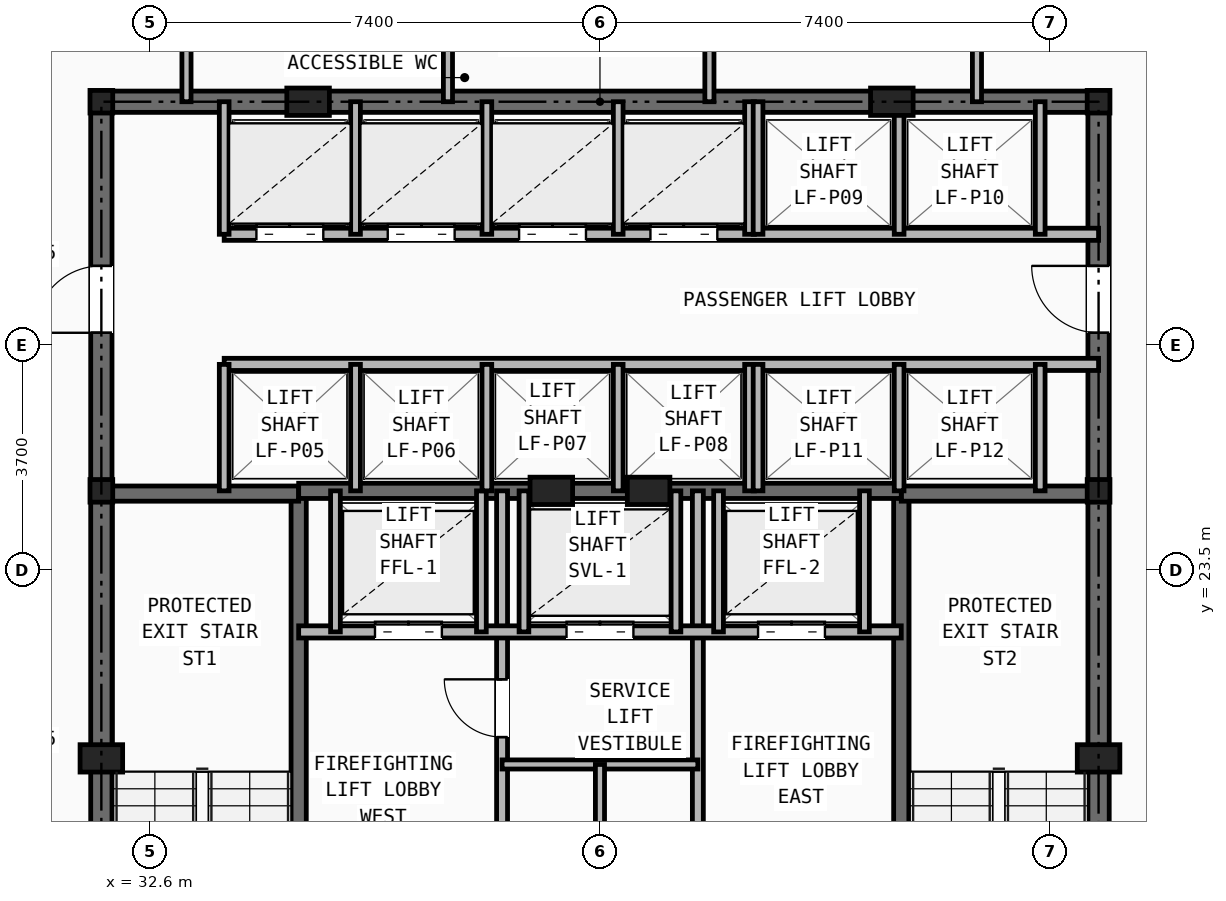
"""IFC4 building model, lengths in metres.
Left out: names, types, materials, properties, quantities, classifications, styles, units other than length and angle.
Written with IfcOpenShell. Run it as: python <this file> out.ifc"""

import sys

from ifc_helpers import new_model, si_unit, direction, frame, frame_2d, origin, origin_2d, place, context, subcontext, project, spatial, rectangle, i_section, extrude, element, fill, save


model = new_model("IFC4")
c1 = context("Model", 3, precision=1e-05, world=origin(), true_north=direction((0.0, 1.0)))
c2 = subcontext(c1, "Body", "Model", "MODEL_VIEW")
j1 = project(units=[si_unit("LENGTHUNIT", "METRE"), si_unit("PLANEANGLEUNIT", "RADIAN")], contexts=[c1])
p1 = place(None, origin())
s1 = spatial("IfcSite", under=j1, at=p1, CompositionType="ELEMENT")
p2 = place(p1, origin())
s2 = spatial("IfcBuilding", under=s1, at=p2, CompositionType="ELEMENT")
p3 = place(p2, frame((0.0, 0.0, 99.0)))
s3 = spatial("IfcBuildingStorey", under=s2, at=p3, CompositionType="ELEMENT", Elevation=99.0)
for number, where, z_axis, x_axis in (
    (1, (31.8, 24.8, 0.0), (0.0, 0.0, 1.0), (1.0, 0.0, 0.0)),
    (2, (48.2, 24.8, 0.0), (0.0, 0.0, 1.0), (1.0, 0.0, 0.0)),
    (3, (31.8, 31.2, 0.0), (0.0, 0.0, 1.0), (1.0, 0.0, 0.0)),
    (4, (48.2, 31.2, 0.0), (0.0, 0.0, 1.0), (1.0, 0.0, 0.0)),
):
    element("IfcColumn", number, at=place(p3, frame(where, z_axis=z_axis, x_axis=x_axis)), inside=s3, PredefinedType="COLUMN", context=c2, shape_type="SweptSolid", body=[
        extrude(i_section(OverallWidth=0.374, OverallDepth=0.372, WebThickness=0.016, FlangeThickness=0.026, at=origin_2d()), origin(), (0.0, 0.0, 1.0), 3.2),
    ])
for number, where, z_axis, x_axis in (
    (5, (31.8, 20.4, 0.0), (0.0, 0.0, 1.0), (1.0, 0.0, 0.0)),
    (6, (48.2, 20.4, 0.0), (0.0, 0.0, 1.0), (1.0, 0.0, 0.0)),
    (7, (35.2, 31.2, 0.0), (0.0, 0.0, 1.0), (1.0, 0.0, 0.0)),
    (8, (44.8, 31.2, 0.0), (0.0, 0.0, 1.0), (1.0, 0.0, 0.0)),
    (9, (39.2, 24.8, 0.0), (0.0, 0.0, 1.0), (1.0, 0.0, 0.0)),
    (10, (40.8, 24.8, 0.0), (0.0, 0.0, 1.0), (1.0, 0.0, 0.0)),
):
    element("IfcColumn", number, at=place(p3, frame(where, z_axis=z_axis, x_axis=x_axis)), inside=s3, PredefinedType="PILASTER", context=c2, shape_type="SweptSolid", body=[
        extrude(rectangle(XDim=0.7, YDim=0.45, at=origin_2d()), origin(), (0.0, 0.0, 1.0), 3.2),
    ])
p4 = place(p3, frame((31.8, 31.2, 0.0), z_axis=(0.0, 0.0, 1.0), x_axis=(1.0, 0.0, 0.0)))
e11 = element("IfcWall", 11, at=p4, inside=s3, PredefinedType="SHEAR", context=c2, shape_type="SweptSolid", body=[
    extrude(rectangle(XDim=16.4, YDim=0.35, at=frame_2d((8.2, 0.0))), origin(), (0.0, 0.0, 1.0), 2.97),
])
p5 = place(p3, frame((31.8, 16.4, 0.0), z_axis=(0.0, 0.0, 1.0), x_axis=(0.0, 1.0, 0.0)))
e12 = element("IfcWall", 12, at=p5, inside=s3, PredefinedType="SHEAR", context=c2, shape_type="SweptSolid", body=[
    extrude(rectangle(XDim=14.8, YDim=0.35, at=frame_2d((7.4, 0.0))), origin(), (0.0, 0.0, 1.0), 2.97),
])
p6 = place(p5, frame((11.0, 0.0, 0.0)))
e13 = element("IfcOpeningElement", 13, at=p6, cuts=e12, PredefinedType="OPENING", context=c2, shape_type="SweptSolid", body=[
    extrude(rectangle(XDim=1.1, YDim=2.15, at=frame_2d((0.55, 1.075))), frame((0.0, 0.185, 0.0), z_axis=(0.0, -1.0, 0.0), x_axis=(1.0, 0.0, 0.0)), (0.0, 0.0, 1.0), 0.37),
])
p7 = place(p3, frame((48.2, 16.4, 0.0), z_axis=(0.0, 0.0, 1.0), x_axis=(0.0, 1.0, 0.0)))
e14 = element("IfcWall", 14, at=p7, inside=s3, PredefinedType="SHEAR", context=c2, shape_type="SweptSolid", body=[
    extrude(rectangle(XDim=14.8, YDim=0.35, at=frame_2d((7.4, 0.0))), origin(), (0.0, 0.0, 1.0), 2.97),
])
p8 = place(p7, frame((11.0, 0.0, 0.0)))
e15 = element("IfcOpeningElement", 15, at=p8, cuts=e14, PredefinedType="OPENING", context=c2, shape_type="SweptSolid", body=[
    extrude(rectangle(XDim=1.1, YDim=2.15, at=frame_2d((0.55, 1.075))), frame((0.0, 0.185, 0.0), z_axis=(0.0, -1.0, 0.0), x_axis=(1.0, 0.0, 0.0)), (0.0, 0.0, 1.0), 0.37),
])
p9 = place(p3, frame((35.045, 16.4, 0.0), z_axis=(0.0, 0.0, 1.0), x_axis=(0.0, 1.0, 0.0)))
e16 = element("IfcWall", 16, at=p9, inside=s3, PredefinedType="SHEAR", context=c2, shape_type="SweptSolid", body=[
    extrude(rectangle(XDim=8.4, YDim=0.25, at=frame_2d((4.2, 0.0))), origin(), (0.0, 0.0, 1.0), 2.97),
])
p10 = place(p9, frame((0.45, 0.0, 0.0)))
e17 = element("IfcOpeningElement", 17, at=p10, cuts=e16, PredefinedType="OPENING", context=c2, shape_type="SweptSolid", body=[
    extrude(rectangle(XDim=0.95, YDim=2.1, at=frame_2d((0.475, 1.05))), frame((0.0, 0.135, 0.0), z_axis=(0.0, -1.0, 0.0), x_axis=(1.0, 0.0, 0.0)), (0.0, 0.0, 1.0), 0.27),
])
p11 = place(p3, frame((31.8, 24.755, 0.0), z_axis=(0.0, 0.0, 1.0), x_axis=(1.0, 0.0, 0.0)))
e18 = element("IfcWall", 18, at=p11, inside=s3, PredefinedType="SHEAR", context=c2, shape_type="SweptSolid", body=[
    extrude(rectangle(XDim=3.245, YDim=0.25, at=frame_2d((1.623, 0.0))), origin(), (0.0, 0.0, 1.0), 2.97),
])
p12 = place(p3, frame((44.955, 16.4, 0.0), z_axis=(0.0, 0.0, 1.0), x_axis=(0.0, 1.0, 0.0)))
e19 = element("IfcWall", 19, at=p12, inside=s3, PredefinedType="SHEAR", context=c2, shape_type="SweptSolid", body=[
    extrude(rectangle(XDim=8.4, YDim=0.25, at=frame_2d((4.2, 0.0))), origin(), (0.0, 0.0, 1.0), 2.97),
])
p13 = place(p12, frame((0.45, 0.0, 0.0)))
e20 = element("IfcOpeningElement", 20, at=p13, cuts=e19, PredefinedType="OPENING", context=c2, shape_type="SweptSolid", body=[
    extrude(rectangle(XDim=0.95, YDim=2.1, at=frame_2d((0.475, 1.05))), frame((0.0, 0.135, 0.0), z_axis=(0.0, -1.0, 0.0), x_axis=(1.0, 0.0, 0.0)), (0.0, 0.0, 1.0), 0.27),
])
p14 = place(p3, frame((44.955, 24.755, 0.0), z_axis=(0.0, 0.0, 1.0), x_axis=(1.0, 0.0, 0.0)))
e21 = element("IfcWall", 21, at=p14, inside=s3, PredefinedType="SHEAR", context=c2, shape_type="SweptSolid", body=[
    extrude(rectangle(XDim=3.245, YDim=0.25, at=frame_2d((1.623, 0.0))), origin(), (0.0, 0.0, 1.0), 2.97),
])
p15 = place(p3, frame((35.045, 24.8, 0.0), z_axis=(0.0, 0.0, 1.0), x_axis=(1.0, 0.0, 0.0)))
e22 = element("IfcWall", 22, at=p15, inside=s3, PredefinedType="SHEAR", context=c2, shape_type="SweptSolid", body=[
    extrude(rectangle(XDim=9.91, YDim=0.25, at=frame_2d((4.955, 0.0))), origin(), (0.0, 0.0, 1.0), 2.97),
])
p16 = place(p3, frame((38.39, 16.4, 0.0), z_axis=(0.0, 0.0, 1.0), x_axis=(0.0, 1.0, 0.0)))
e23 = element("IfcWall", 23, at=p16, inside=s3, PredefinedType="PARTITIONING", context=c2, shape_type="SweptSolid", body=[
    extrude(rectangle(XDim=8.4, YDim=0.18, at=frame_2d((4.2, 0.0))), origin(), (0.0, 0.0, 1.0), 2.421),
])
p17 = place(p16, frame((1.8, 0.0, 0.0)))
e24 = element("IfcOpeningElement", 24, at=p17, cuts=e23, PredefinedType="OPENING", context=c2, shape_type="SweptSolid", body=[
    extrude(rectangle(XDim=0.85, YDim=2.05, at=frame_2d((0.425, 1.025))), frame((0.0, 0.1, 0.0), z_axis=(0.0, -1.0, 0.0), x_axis=(1.0, 0.0, 0.0)), (0.0, 0.0, 1.0), 0.2),
])
p18 = place(p16, frame((4.35, 0.0, 0.0)))
e25 = element("IfcOpeningElement", 25, at=p18, cuts=e23, PredefinedType="OPENING", context=c2, shape_type="SweptSolid", body=[
    extrude(rectangle(XDim=0.95, YDim=2.1, at=frame_2d((0.475, 1.05))), frame((0.0, 0.1, 0.0), z_axis=(0.0, -1.0, 0.0), x_axis=(1.0, 0.0, 0.0)), (0.0, 0.0, 1.0), 0.2),
])
p19 = place(p3, frame((41.61, 16.4, 0.0), z_axis=(0.0, 0.0, 1.0), x_axis=(0.0, 1.0, 0.0)))
e26 = element("IfcWall", 26, at=p19, inside=s3, PredefinedType="PARTITIONING", context=c2, shape_type="SweptSolid", body=[
    extrude(rectangle(XDim=8.4, YDim=0.18, at=frame_2d((4.2, 0.0))), origin(), (0.0, 0.0, 1.0), 2.421),
])
p20 = place(p19, frame((1.8, 0.0, 0.0)))
e27 = element("IfcOpeningElement", 27, at=p20, cuts=e26, PredefinedType="OPENING", context=c2, shape_type="SweptSolid", body=[
    extrude(rectangle(XDim=0.85, YDim=2.05, at=frame_2d((0.425, 1.025))), frame((0.0, 0.1, 0.0), z_axis=(0.0, -1.0, 0.0), x_axis=(1.0, 0.0, 0.0)), (0.0, 0.0, 1.0), 0.2),
])
p21 = place(p3, frame((35.045, 22.48, 0.0), z_axis=(0.0, 0.0, 1.0), x_axis=(1.0, 0.0, 0.0)))
e28 = element("IfcWall", 28, at=p21, inside=s3, PredefinedType="SOLIDWALL", context=c2, shape_type="SweptSolid", body=[
    extrude(rectangle(XDim=9.91, YDim=0.2, at=frame_2d((4.955, 0.0))), origin(), (0.0, 0.0, 1.0), 2.97),
])
p22 = place(p21, frame((1.255, 0.0, 0.0)))
e29 = element("IfcOpeningElement", 29, at=p22, cuts=e28, PredefinedType="OPENING", context=c2, shape_type="SweptSolid", body=[
    extrude(rectangle(XDim=1.1, YDim=2.15, at=frame_2d((0.55, 1.075))), frame((0.0, 0.11, 0.0), z_axis=(0.0, -1.0, 0.0), x_axis=(1.0, 0.0, 0.0)), (0.0, 0.0, 1.0), 0.22),
])
p23 = place(p21, frame((7.555, 0.0, 0.0)))
e30 = element("IfcOpeningElement", 30, at=p23, cuts=e28, PredefinedType="OPENING", context=c2, shape_type="SweptSolid", body=[
    extrude(rectangle(XDim=1.1, YDim=2.15, at=frame_2d((0.55, 1.075))), frame((0.0, 0.11, 0.0), z_axis=(0.0, -1.0, 0.0), x_axis=(1.0, 0.0, 0.0)), (0.0, 0.0, 1.0), 0.22),
])
p24 = place(p21, frame((4.405, 0.0, 0.0)))
e31 = element("IfcOpeningElement", 31, at=p24, cuts=e28, PredefinedType="OPENING", context=c2, shape_type="SweptSolid", body=[
    extrude(rectangle(XDim=1.1, YDim=2.15, at=frame_2d((0.55, 1.075))), frame((0.0, 0.11, 0.0), z_axis=(0.0, -1.0, 0.0), x_axis=(1.0, 0.0, 0.0)), (0.0, 0.0, 1.0), 0.22),
])
p25 = place(p3, frame((38.39, 20.3, 0.0), z_axis=(0.0, 0.0, 1.0), x_axis=(1.0, 0.0, 0.0)))
e32 = element("IfcWall", 32, at=p25, inside=s3, PredefinedType="PARTITIONING", context=c2, shape_type="SweptSolid", body=[
    extrude(rectangle(XDim=3.22, YDim=0.15, at=frame_2d((1.61, 0.0))), origin(), (0.0, 0.0, 1.0), 2.97),
])
p26 = place(p3, frame((40.0, 16.4, 0.0), z_axis=(0.0, 0.0, 1.0), x_axis=(0.0, 1.0, 0.0)))
e33 = element("IfcWall", 33, at=p26, inside=s3, PredefinedType="PARTITIONING", context=c2, shape_type="SweptSolid", body=[
    extrude(rectangle(XDim=3.9, YDim=0.15, at=frame_2d((1.95, 0.0))), origin(), (0.0, 0.0, 1.0), 2.421),
])
for number, where, z_axis, x_axis in (
    (34, (35.65, 22.48, 0.0), (0.0, 0.0, 1.0), (0.0, 1.0, 0.0)),
    (35, (38.05, 22.48, 0.0), (0.0, 0.0, 1.0), (0.0, 1.0, 0.0)),
    (36, (41.95, 22.48, 0.0), (0.0, 0.0, 1.0), (0.0, 1.0, 0.0)),
    (37, (44.35, 22.48, 0.0), (0.0, 0.0, 1.0), (0.0, 1.0, 0.0)),
    (38, (38.75, 22.48, 0.0), (0.0, 0.0, 1.0), (0.0, 1.0, 0.0)),
    (39, (41.25, 22.48, 0.0), (0.0, 0.0, 1.0), (0.0, 1.0, 0.0)),
):
    element("IfcWall", number, at=place(p3, frame(where, z_axis=z_axis, x_axis=x_axis)), inside=s3, PredefinedType="SOLIDWALL", context=c2, shape_type="SweptSolid", body=[
        extrude(rectangle(XDim=2.32, YDim=0.16, at=frame_2d((1.16, 0.0))), origin(), (0.0, 0.0, 1.0), 2.97),
    ])
p27 = place(p3, frame((33.82, 29.02, 0.0), z_axis=(0.0, 0.0, 1.0), x_axis=(1.0, 0.0, 0.0)))
e40 = element("IfcWall", 40, at=p27, inside=s3, PredefinedType="SOLIDWALL", context=c2, shape_type="SweptSolid", body=[
    extrude(rectangle(XDim=14.38, YDim=0.2, at=frame_2d((7.19, 0.0))), origin(), (0.0, 0.0, 1.0), 2.421),
])
p28 = place(p27, frame((0.53, 0.0, 0.0)))
e41 = element("IfcOpeningElement", 41, at=p28, cuts=e40, PredefinedType="OPENING", context=c2, shape_type="SweptSolid", body=[
    extrude(rectangle(XDim=1.1, YDim=2.15, at=frame_2d((0.55, 1.075))), frame((0.0, 0.11, 0.0), z_axis=(0.0, -1.0, 0.0), x_axis=(1.0, 0.0, 0.0)), (0.0, 0.0, 1.0), 0.22),
])
p29 = place(p27, frame((2.69, 0.0, 0.0)))
e42 = element("IfcOpeningElement", 42, at=p29, cuts=e40, PredefinedType="OPENING", context=c2, shape_type="SweptSolid", body=[
    extrude(rectangle(XDim=1.1, YDim=2.15, at=frame_2d((0.55, 1.075))), frame((0.0, 0.11, 0.0), z_axis=(0.0, -1.0, 0.0), x_axis=(1.0, 0.0, 0.0)), (0.0, 0.0, 1.0), 0.22),
])
p30 = place(p27, frame((4.85, 0.0, 0.0)))
e43 = element("IfcOpeningElement", 43, at=p30, cuts=e40, PredefinedType="OPENING", context=c2, shape_type="SweptSolid", body=[
    extrude(rectangle(XDim=1.1, YDim=2.15, at=frame_2d((0.55, 1.075))), frame((0.0, 0.11, 0.0), z_axis=(0.0, -1.0, 0.0), x_axis=(1.0, 0.0, 0.0)), (0.0, 0.0, 1.0), 0.22),
])
p31 = place(p27, frame((7.01, 0.0, 0.0)))
e44 = element("IfcOpeningElement", 44, at=p31, cuts=e40, PredefinedType="OPENING", context=c2, shape_type="SweptSolid", body=[
    extrude(rectangle(XDim=1.1, YDim=2.15, at=frame_2d((0.55, 1.075))), frame((0.0, 0.11, 0.0), z_axis=(0.0, -1.0, 0.0), x_axis=(1.0, 0.0, 0.0)), (0.0, 0.0, 1.0), 0.22),
])
p32 = place(p3, frame((33.82, 26.88, 0.0), z_axis=(0.0, 0.0, 1.0), x_axis=(1.0, 0.0, 0.0)))
e45 = element("IfcWall", 45, at=p32, inside=s3, PredefinedType="SOLIDWALL", context=c2, shape_type="SweptSolid", body=[
    extrude(rectangle(XDim=14.38, YDim=0.2, at=frame_2d((7.19, 0.0))), origin(), (0.0, 0.0, 1.0), 2.421),
])
p33 = place(p3, frame((33.82, 29.02, 0.0), z_axis=(0.0, 0.0, 1.0), x_axis=(0.0, 1.0, 0.0)))
e46 = element("IfcWall", 46, at=p33, inside=s3, PredefinedType="SOLIDWALL", context=c2, shape_type="SweptSolid", body=[
    extrude(rectangle(XDim=2.18, YDim=0.16, at=frame_2d((1.09, 0.0))), origin(), (0.0, 0.0, 1.0), 2.421),
])
p34 = place(p3, frame((33.82, 24.8, 0.0), z_axis=(0.0, 0.0, 1.0), x_axis=(0.0, 1.0, 0.0)))
e47 = element("IfcWall", 47, at=p34, inside=s3, PredefinedType="SOLIDWALL", context=c2, shape_type="SweptSolid", body=[
    extrude(rectangle(XDim=2.08, YDim=0.16, at=frame_2d((1.04, 0.0))), origin(), (0.0, 0.0, 1.0), 2.97),
])
for number, where, z_axis, x_axis in (
    (48, (35.98, 29.02, 0.0), (0.0, 0.0, 1.0), (0.0, 1.0, 0.0)),
    (49, (38.14, 29.02, 0.0), (0.0, 0.0, 1.0), (0.0, 1.0, 0.0)),
    (50, (40.3, 29.02, 0.0), (0.0, 0.0, 1.0), (0.0, 1.0, 0.0)),
    (51, (42.46, 29.02, 0.0), (0.0, 0.0, 1.0), (0.0, 1.0, 0.0)),
):
    element("IfcWall", number, at=place(p3, frame(where, z_axis=z_axis, x_axis=x_axis)), inside=s3, PredefinedType="SOLIDWALL", context=c2, shape_type="SweptSolid", body=[
        extrude(rectangle(XDim=2.18, YDim=0.16, at=frame_2d((1.09, 0.0))), origin(), (0.0, 0.0, 1.0), 2.421),
    ])
for number, where, z_axis, x_axis in (
    (52, (35.98, 24.8, 0.0), (0.0, 0.0, 1.0), (0.0, 1.0, 0.0)),
    (53, (38.14, 24.8, 0.0), (0.0, 0.0, 1.0), (0.0, 1.0, 0.0)),
    (54, (40.3, 24.8, 0.0), (0.0, 0.0, 1.0), (0.0, 1.0, 0.0)),
    (55, (42.46, 24.8, 0.0), (0.0, 0.0, 1.0), (0.0, 1.0, 0.0)),
):
    element("IfcWall", number, at=place(p3, frame(where, z_axis=z_axis, x_axis=x_axis)), inside=s3, PredefinedType="SOLIDWALL", context=c2, shape_type="SweptSolid", body=[
        extrude(rectangle(XDim=2.08, YDim=0.16, at=frame_2d((1.04, 0.0))), origin(), (0.0, 0.0, 1.0), 2.97),
    ])
for number, where, z_axis, x_axis in (
    (56, (42.6, 29.02, 0.0), (0.0, 0.0, 1.0), (0.0, 1.0, 0.0)),
    (57, (44.92, 29.02, 0.0), (0.0, 0.0, 1.0), (0.0, 1.0, 0.0)),
    (58, (47.24, 29.02, 0.0), (0.0, 0.0, 1.0), (0.0, 1.0, 0.0)),
):
    element("IfcWall", number, at=place(p3, frame(where, z_axis=z_axis, x_axis=x_axis)), inside=s3, PredefinedType="SOLIDWALL", context=c2, shape_type="SweptSolid", body=[
        extrude(rectangle(XDim=2.18, YDim=0.16, at=frame_2d((1.09, 0.0))), origin(), (0.0, 0.0, 1.0), 2.421),
    ])
for number, where, z_axis, x_axis in (
    (59, (42.6, 24.8, 0.0), (0.0, 0.0, 1.0), (0.0, 1.0, 0.0)),
    (60, (44.92, 24.8, 0.0), (0.0, 0.0, 1.0), (0.0, 1.0, 0.0)),
    (61, (47.24, 24.8, 0.0), (0.0, 0.0, 1.0), (0.0, 1.0, 0.0)),
):
    element("IfcWall", number, at=place(p3, frame(where, z_axis=z_axis, x_axis=x_axis)), inside=s3, PredefinedType="SOLIDWALL", context=c2, shape_type="SweptSolid", body=[
        extrude(rectangle(XDim=2.08, YDim=0.16, at=frame_2d((1.04, 0.0))), origin(), (0.0, 0.0, 1.0), 2.97),
    ])
for number, where, z_axis, x_axis in (
    (62, (33.2, 31.2, 0.0), (0.0, 0.0, 1.0), (0.0, 1.0, 0.0)),
    (63, (46.2, 31.2, 0.0), (0.0, 0.0, 1.0), (0.0, 1.0, 0.0)),
    (64, (37.5, 31.2, 0.0), (0.0, 0.0, 1.0), (0.0, 1.0, 0.0)),
    (65, (41.8, 31.2, 0.0), (0.0, 0.0, 1.0), (0.0, 1.0, 0.0)),
):
    element("IfcWall", number, at=place(p3, frame(where, z_axis=z_axis, x_axis=x_axis)), inside=s3, PredefinedType="PARTITIONING", context=c2, shape_type="SweptSolid", body=[
        extrude(rectangle(XDim=2.6, YDim=0.15, at=frame_2d((1.3, 0.0))), origin(), (0.0, 0.0, 1.0), 2.421),
    ])
p35 = place(p18, origin())
e66 = element("IfcDoor", 66, at=p35, inside=s3, OperationType="SINGLE_SWING_RIGHT", PredefinedType="DOOR", context=c2, shape_type="SweptSolid", body=[
    extrude(rectangle(XDim=0.95, YDim=2.1, at=frame_2d((0.475, 1.05))), frame((0.0, 0.025, 0.0), z_axis=(0.0, -1.0, 0.0), x_axis=(1.0, 0.0, 0.0)), (0.0, 0.0, 1.0), 0.05),
])
fill(e25, e66)
p36 = place(p22, origin())
e67 = element("IfcDoor", 67, at=p36, inside=s3, OperationType="DOUBLE_DOOR_SLIDING", PredefinedType="DOOR", context=c2, shape_type="SweptSolid", body=[
    extrude(rectangle(XDim=1.1, YDim=2.15, at=frame_2d((0.55, 1.075))), frame((0.0, 0.025, 0.0), z_axis=(0.0, -1.0, 0.0), x_axis=(1.0, 0.0, 0.0)), (0.0, 0.0, 1.0), 0.05),
])
fill(e29, e67)
p37 = place(p23, origin())
e68 = element("IfcDoor", 68, at=p37, inside=s3, OperationType="DOUBLE_DOOR_SLIDING", PredefinedType="DOOR", context=c2, shape_type="SweptSolid", body=[
    extrude(rectangle(XDim=1.1, YDim=2.15, at=frame_2d((0.55, 1.075))), frame((0.0, 0.025, 0.0), z_axis=(0.0, -1.0, 0.0), x_axis=(1.0, 0.0, 0.0)), (0.0, 0.0, 1.0), 0.05),
])
fill(e30, e68)
p38 = place(p24, origin())
e69 = element("IfcDoor", 69, at=p38, inside=s3, OperationType="DOUBLE_DOOR_SLIDING", PredefinedType="DOOR", context=c2, shape_type="SweptSolid", body=[
    extrude(rectangle(XDim=1.1, YDim=2.15, at=frame_2d((0.55, 1.075))), frame((0.0, 0.025, 0.0), z_axis=(0.0, -1.0, 0.0), x_axis=(1.0, 0.0, 0.0)), (0.0, 0.0, 1.0), 0.05),
])
fill(e31, e69)
p39 = place(p6, origin())
e70 = element("IfcDoor", 70, at=p39, inside=s3, OperationType="SINGLE_SWING_LEFT", PredefinedType="DOOR", context=c2, shape_type="SweptSolid", body=[
    extrude(rectangle(XDim=1.1, YDim=2.15, at=frame_2d((0.55, 1.075))), frame((0.0, 0.025, 0.0), z_axis=(0.0, -1.0, 0.0), x_axis=(1.0, 0.0, 0.0)), (0.0, 0.0, 1.0), 0.05),
])
fill(e13, e70)
p40 = place(p8, origin())
e71 = element("IfcDoor", 71, at=p40, inside=s3, OperationType="SINGLE_SWING_RIGHT", PredefinedType="DOOR", context=c2, shape_type="SweptSolid", body=[
    extrude(rectangle(XDim=1.1, YDim=2.15, at=frame_2d((0.55, 1.075))), frame((0.0, 0.025, 0.0), z_axis=(0.0, -1.0, 0.0), x_axis=(1.0, 0.0, 0.0)), (0.0, 0.0, 1.0), 0.05),
])
fill(e15, e71)
p41 = place(p28, origin())
e72 = element("IfcDoor", 72, at=p41, inside=s3, OperationType="DOUBLE_DOOR_SLIDING", PredefinedType="DOOR", context=c2, shape_type="SweptSolid", body=[
    extrude(rectangle(XDim=1.1, YDim=2.15, at=frame_2d((0.55, 1.075))), frame((0.0, 0.025, 0.0), z_axis=(0.0, -1.0, 0.0), x_axis=(1.0, 0.0, 0.0)), (0.0, 0.0, 1.0), 0.05),
])
fill(e41, e72)
p42 = place(p29, origin())
e73 = element("IfcDoor", 73, at=p42, inside=s3, OperationType="DOUBLE_DOOR_SLIDING", PredefinedType="DOOR", context=c2, shape_type="SweptSolid", body=[
    extrude(rectangle(XDim=1.1, YDim=2.15, at=frame_2d((0.55, 1.075))), frame((0.0, 0.025, 0.0), z_axis=(0.0, -1.0, 0.0), x_axis=(1.0, 0.0, 0.0)), (0.0, 0.0, 1.0), 0.05),
])
fill(e42, e73)
p43 = place(p30, origin())
e74 = element("IfcDoor", 74, at=p43, inside=s3, OperationType="DOUBLE_DOOR_SLIDING", PredefinedType="DOOR", context=c2, shape_type="SweptSolid", body=[
    extrude(rectangle(XDim=1.1, YDim=2.15, at=frame_2d((0.55, 1.075))), frame((0.0, 0.025, 0.0), z_axis=(0.0, -1.0, 0.0), x_axis=(1.0, 0.0, 0.0)), (0.0, 0.0, 1.0), 0.05),
])
fill(e43, e74)
p44 = place(p31, origin())
e75 = element("IfcDoor", 75, at=p44, inside=s3, OperationType="DOUBLE_DOOR_SLIDING", PredefinedType="DOOR", context=c2, shape_type="SweptSolid", body=[
    extrude(rectangle(XDim=1.1, YDim=2.15, at=frame_2d((0.55, 1.075))), frame((0.0, 0.025, 0.0), z_axis=(0.0, -1.0, 0.0), x_axis=(1.0, 0.0, 0.0)), (0.0, 0.0, 1.0), 0.05),
])
fill(e44, e75)
save(model, sys.argv[1])
